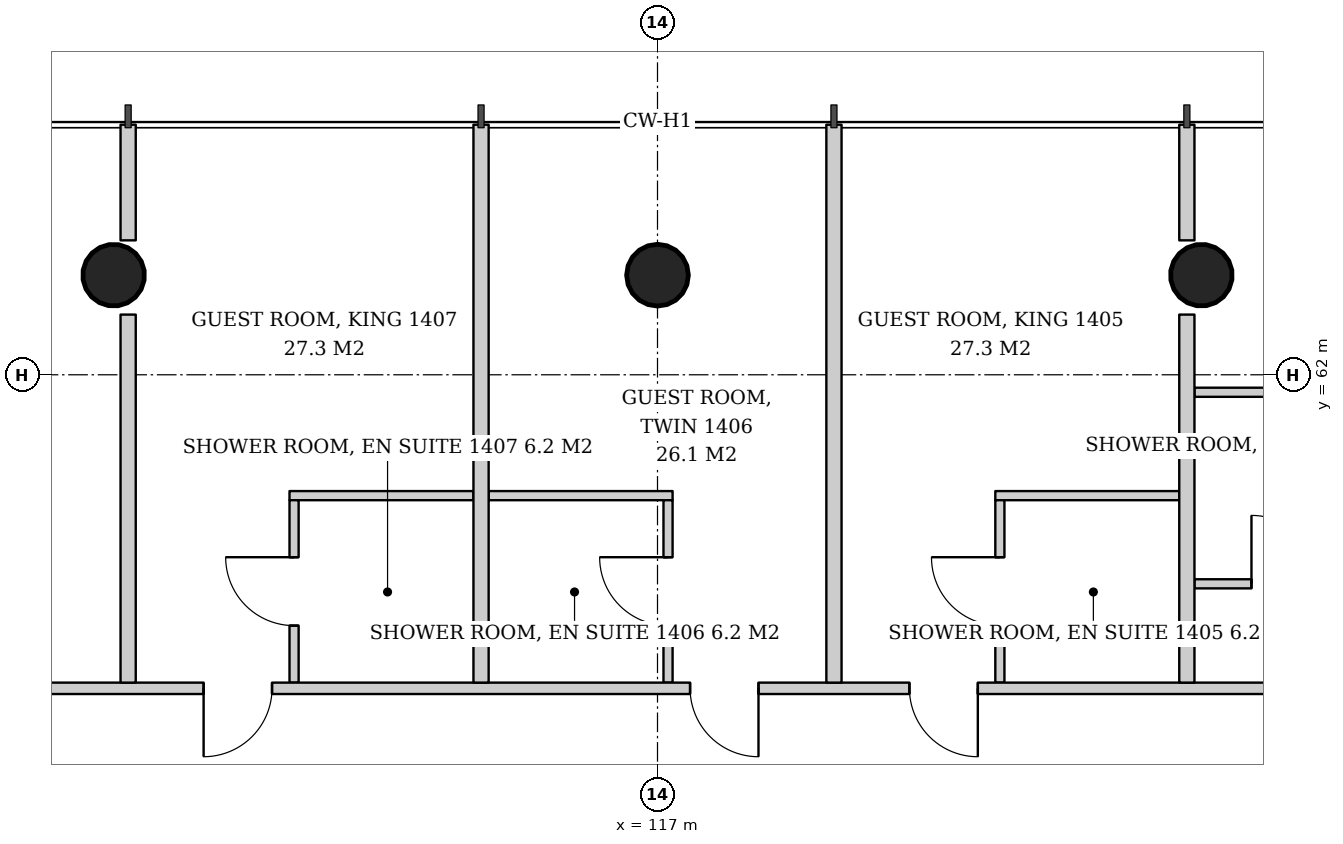
"""IFC4 building model, lengths in metres.
Left out: names, types, materials, properties, quantities, classifications, styles, units other than length and angle.
Written with IfcOpenShell. Run it as: python <this file> out.ifc"""

import sys

from ifc_helpers import new_model, si_unit, direction, frame, frame_2d, origin, origin_2d, place, context, subcontext, project, spatial, rectangle, hollow_circle, extrude, element, fill, save


model = new_model("IFC4")
c1 = context("Model", 3, precision=1e-05, world=origin(), true_north=direction((0.0, 1.0)))
c2 = subcontext(c1, "Body", "Model", "MODEL_VIEW")
j1 = project(units=[si_unit("LENGTHUNIT", "METRE"), si_unit("PLANEANGLEUNIT", "RADIAN")], contexts=[c1])
p1 = place(None, origin())
s1 = spatial("IfcSite", under=j1, at=p1, CompositionType="ELEMENT")
p2 = place(p1, origin())
s2 = spatial("IfcBuilding", under=s1, at=p2, CompositionType="ELEMENT")
p3 = place(p2, frame((0.0, 0.0, 59.0)))
s3 = spatial("IfcBuildingStorey", under=s2, at=p3, CompositionType="ELEMENT", Elevation=59.0)
p4 = place(p3, frame((124.181, 63.362, 0.0), z_axis=(-0.021561848751, -0.043059525333, 0.998839808957), x_axis=(0.894160516368, -0.44774654769, 0.0)))
e1 = element("IfcColumn", 1, at=p4, inside=s3, PredefinedType="COLUMN", context=c2, shape_type="SweptSolid", body=[
    extrude(hollow_circle(Radius=0.406, WallThickness=0.03, at=origin_2d()), origin(), (0.0, 0.0, 1.0), 3.804),
])
p5 = place(p3, frame((117.0, 63.362, 0.0), z_axis=(0.0, -0.043069538298, 0.999072076915), x_axis=(1.0, 0.0, 0.0)))
e2 = element("IfcColumn", 2, at=p5, inside=s3, PredefinedType="COLUMN", context=c2, shape_type="SweptSolid", body=[
    extrude(hollow_circle(Radius=0.406, WallThickness=0.03, at=origin_2d()), origin(), (0.0, 0.0, 1.0), 3.803),
])
p6 = place(p3, frame((109.819, 63.362, 0.0), z_axis=(0.021561848751, -0.043059525333, 0.998839808957), x_axis=(0.894160516368, 0.44774654769, 0.0)))
e3 = element("IfcColumn", 3, at=p6, inside=s3, PredefinedType="COLUMN", context=c2, shape_type="SweptSolid", body=[
    extrude(hollow_circle(Radius=0.406, WallThickness=0.03, at=origin_2d()), origin(), (0.0, 0.0, 1.0), 3.804),
])
p7 = place(p3, frame((124.064, 59.25, 0.0), z_axis=(0.0, 0.0, 1.0), x_axis=(1.0, 0.0, 0.0)))
e4 = element("IfcWall", 4, at=p7, inside=s3, PredefinedType="PARTITIONING", context=c2, shape_type="SweptSolid", body=[
    extrude(rectangle(XDim=2.58, YDim=0.12, at=frame_2d((1.29, 0.0))), origin(), (0.0, 0.0, 1.0), 2.8),
])
p8 = place(p7, frame((0.75, 0.0, 0.0)))
e5 = element("IfcOpeningElement", 5, at=p8, cuts=e4, PredefinedType="OPENING", context=c2, shape_type="SweptSolid", body=[
    extrude(rectangle(XDim=0.9, YDim=2.1, at=frame_2d((0.45, 1.05))), frame((0.0, 0.07, 0.0), z_axis=(0.0, -1.0, 0.0), x_axis=(1.0, 0.0, 0.0)), (0.0, 0.0, 1.0), 0.14),
])
p9 = place(p3, frame((124.064, 61.77, 0.0), z_axis=(0.0, 0.0, 1.0), x_axis=(1.0, 0.0, 0.0)))
e6 = element("IfcWall", 6, at=p9, inside=s3, PredefinedType="PARTITIONING", context=c2, shape_type="SweptSolid", body=[
    extrude(rectangle(XDim=2.58, YDim=0.12, at=frame_2d((1.29, 0.0))), origin(), (0.0, 0.0, 1.0), 2.8),
])
p10 = place(p3, frame((123.864, 60.41, 0.0), z_axis=(0.0, 0.0, 1.0), x_axis=(-1.0, 0.0, 0.0)))
e7 = element("IfcWall", 7, at=p10, inside=s3, PredefinedType="PARTITIONING", context=c2, shape_type="SweptSolid", body=[
    extrude(rectangle(XDim=2.42, YDim=0.12, at=frame_2d((1.21, 0.0))), origin(), (0.0, 0.0, 1.0), 2.847),
])
p11 = place(p3, frame((121.504, 57.95, 0.0), z_axis=(0.0, 0.0, 1.0), x_axis=(0.0, 1.0, 0.0)))
e8 = element("IfcWall", 8, at=p11, inside=s3, PredefinedType="PARTITIONING", context=c2, shape_type="SweptSolid", body=[
    extrude(rectangle(XDim=2.4, YDim=0.12, at=frame_2d((1.2, 0.0))), origin(), (0.0, 0.0, 1.0), 3.6),
])
p12 = place(p11, frame((0.75, 0.0, 0.0)))
e9 = element("IfcOpeningElement", 9, at=p12, cuts=e8, PredefinedType="OPENING", context=c2, shape_type="SweptSolid", body=[
    extrude(rectangle(XDim=0.9, YDim=2.1, at=frame_2d((0.45, 1.05))), frame((0.0, 0.07, 0.0), z_axis=(0.0, -1.0, 0.0), x_axis=(1.0, 0.0, 0.0)), (0.0, 0.0, 1.0), 0.14),
])
p13 = place(p3, frame((117.198, 60.41, 0.0), z_axis=(0.0, 0.0, 1.0), x_axis=(-1.0, 0.0, 0.0)))
e10 = element("IfcWall", 10, at=p13, inside=s3, PredefinedType="PARTITIONING", context=c2, shape_type="SweptSolid", body=[
    extrude(rectangle(XDim=2.42, YDim=0.12, at=frame_2d((1.21, 0.0))), origin(), (0.0, 0.0, 1.0), 3.6),
])
p14 = place(p3, frame((117.139, 57.95, 0.0), z_axis=(0.0, 0.0, 1.0), x_axis=(0.0, 1.0, 0.0)))
e11 = element("IfcWall", 11, at=p14, inside=s3, PredefinedType="PARTITIONING", context=c2, shape_type="SweptSolid", body=[
    extrude(rectangle(XDim=2.4, YDim=0.12, at=frame_2d((1.2, 0.0))), origin(), (0.0, 0.0, 1.0), 3.6),
])
p15 = place(p14, frame((0.75, 0.0, 0.0)))
e12 = element("IfcOpeningElement", 12, at=p15, cuts=e11, PredefinedType="OPENING", context=c2, shape_type="SweptSolid", body=[
    extrude(rectangle(XDim=0.9, YDim=2.1, at=frame_2d((0.45, 1.05))), frame((0.0, 0.07, 0.0), z_axis=(0.0, -1.0, 0.0), x_axis=(1.0, 0.0, 0.0)), (0.0, 0.0, 1.0), 0.14),
])
p16 = place(p3, frame((114.579, 60.41, 0.0), z_axis=(0.0, 0.0, 1.0), x_axis=(-1.0, 0.0, 0.0)))
e13 = element("IfcWall", 13, at=p16, inside=s3, PredefinedType="PARTITIONING", context=c2, shape_type="SweptSolid", body=[
    extrude(rectangle(XDim=2.42, YDim=0.12, at=frame_2d((1.21, 0.0))), origin(), (0.0, 0.0, 1.0), 2.847),
])
p17 = place(p3, frame((112.219, 57.95, 0.0), z_axis=(0.0, 0.0, 1.0), x_axis=(0.0, 1.0, 0.0)))
e14 = element("IfcWall", 14, at=p17, inside=s3, PredefinedType="PARTITIONING", context=c2, shape_type="SweptSolid", body=[
    extrude(rectangle(XDim=2.4, YDim=0.12, at=frame_2d((1.2, 0.0))), origin(), (0.0, 0.0, 1.0), 3.6),
])
p18 = place(p17, frame((0.75, 0.0, 0.0)))
e15 = element("IfcOpeningElement", 15, at=p18, cuts=e14, PredefinedType="OPENING", context=c2, shape_type="SweptSolid", body=[
    extrude(rectangle(XDim=0.9, YDim=2.1, at=frame_2d((0.45, 1.05))), frame((0.0, 0.07, 0.0), z_axis=(0.0, -1.0, 0.0), x_axis=(1.0, 0.0, 0.0)), (0.0, 0.0, 1.0), 0.14),
])
p19 = place(p3, frame((128.95, 57.875, 0.0), z_axis=(0.0, 0.0, 1.0), x_axis=(-1.0, 0.0, 0.0)))
e16 = element("IfcWall", 16, at=p19, inside=s3, PredefinedType="PARTITIONING", context=c2, shape_type="SweptSolid", body=[
    extrude(rectangle(XDim=23.75, YDim=0.15, at=frame_2d((11.875, 0.0))), origin(), (0.0, 0.0, 1.0), 2.8),
])
p20 = place(p19, frame((2.068, 0.0, 0.0)))
e17 = element("IfcOpeningElement", 17, at=p20, cuts=e16, PredefinedType="OPENING", context=c2, shape_type="SweptSolid", body=[
    extrude(rectangle(XDim=0.9, YDim=2.1, at=frame_2d((0.45, 1.05))), frame((0.0, 0.085, 0.0), z_axis=(0.0, -1.0, 0.0), x_axis=(1.0, 0.0, 0.0)), (0.0, 0.0, 1.0), 0.17),
])
p21 = place(p19, frame((7.736, 0.0, 0.0)))
e18 = element("IfcOpeningElement", 18, at=p21, cuts=e16, PredefinedType="OPENING", context=c2, shape_type="SweptSolid", body=[
    extrude(rectangle(XDim=0.9, YDim=2.1, at=frame_2d((0.45, 1.05))), frame((0.0, 0.085, 0.0), z_axis=(0.0, -1.0, 0.0), x_axis=(1.0, 0.0, 0.0)), (0.0, 0.0, 1.0), 0.17),
])
p22 = place(p19, frame((10.621, 0.0, 0.0)))
e19 = element("IfcOpeningElement", 19, at=p22, cuts=e16, PredefinedType="OPENING", context=c2, shape_type="SweptSolid", body=[
    extrude(rectangle(XDim=0.9, YDim=2.1, at=frame_2d((0.45, 1.05))), frame((0.0, 0.085, 0.0), z_axis=(0.0, -1.0, 0.0), x_axis=(1.0, 0.0, 0.0)), (0.0, 0.0, 1.0), 0.17),
])
p23 = place(p19, frame((17.021, 0.0, 0.0)))
e20 = element("IfcOpeningElement", 20, at=p23, cuts=e16, PredefinedType="OPENING", context=c2, shape_type="SweptSolid", body=[
    extrude(rectangle(XDim=0.9, YDim=2.1, at=frame_2d((0.45, 1.05))), frame((0.0, 0.085, 0.0), z_axis=(0.0, -1.0, 0.0), x_axis=(1.0, 0.0, 0.0)), (0.0, 0.0, 1.0), 0.17),
])
p24 = place(p3, frame((123.964, 57.95, 0.0), z_axis=(0.0, 0.0, 1.0), x_axis=(0.0, 1.0, 0.0)))
e21 = element("IfcWall", 21, at=p24, inside=s3, PredefinedType="PARTITIONING", context=c2, shape_type="SweptSolid", body=[
    extrude(rectangle(XDim=4.842, YDim=0.2, at=frame_2d((2.421, 0.0))), origin(), (0.0, 0.0, 1.0), 3.6),
])
p25 = place(p3, frame((123.964, 63.769, 0.0), z_axis=(0.0, 0.0, 1.0), x_axis=(0.0, 1.0, 0.0)))
e22 = element("IfcWall", 22, at=p25, inside=s3, PredefinedType="PARTITIONING", context=c2, shape_type="SweptSolid", body=[
    extrude(rectangle(XDim=1.521, YDim=0.2, at=frame_2d((0.761, 0.0))), origin(), (0.0, 0.0, 1.0), 3.6),
])
for number, where, z_axis, x_axis in (
    (23, (119.322, 57.95, 0.0), (0.0, 0.0, 1.0), (0.0, 1.0, 0.0)),
    (24, (114.678, 57.95, 0.0), (0.0, 0.0, 1.0), (0.0, 1.0, 0.0)),
):
    element("IfcWall", number, at=place(p3, frame(where, z_axis=z_axis, x_axis=x_axis)), inside=s3, PredefinedType="PARTITIONING", context=c2, shape_type="SweptSolid", body=[
        extrude(rectangle(XDim=7.34, YDim=0.2, at=frame_2d((3.67, 0.0))), origin(), (0.0, 0.0, 1.0), 3.05),
    ])
p26 = place(p3, frame((110.036, 57.95, 0.0), z_axis=(0.0, 0.0, 1.0), x_axis=(0.0, 1.0, 0.0)))
e25 = element("IfcWall", 25, at=p26, inside=s3, PredefinedType="PARTITIONING", context=c2, shape_type="SweptSolid", body=[
    extrude(rectangle(XDim=4.842, YDim=0.2, at=frame_2d((2.421, 0.0))), origin(), (0.0, 0.0, 1.0), 3.6),
])
p27 = place(p3, frame((110.036, 63.769, 0.0), z_axis=(0.0, 0.0, 1.0), x_axis=(0.0, 1.0, 0.0)))
e26 = element("IfcWall", 26, at=p27, inside=s3, PredefinedType="PARTITIONING", context=c2, shape_type="SweptSolid", body=[
    extrude(rectangle(XDim=1.521, YDim=0.2, at=frame_2d((0.761, 0.0))), origin(), (0.0, 0.0, 1.0), 3.6),
])
p28 = place(p8, origin())
e27 = element("IfcDoor", 27, at=p28, inside=s3, OperationType="SINGLE_SWING_LEFT", PredefinedType="DOOR", context=c2, shape_type="SweptSolid", body=[
    extrude(rectangle(XDim=0.9, YDim=2.1, at=frame_2d((0.45, 1.05))), frame((0.0, 0.025, 0.0), z_axis=(0.0, -1.0, 0.0), x_axis=(1.0, 0.0, 0.0)), (0.0, 0.0, 1.0), 0.05),
])
fill(e5, e27)
p29 = place(p12, origin())
e28 = element("IfcDoor", 28, at=p29, inside=s3, OperationType="SINGLE_SWING_RIGHT", PredefinedType="DOOR", context=c2, shape_type="SweptSolid", body=[
    extrude(rectangle(XDim=0.9, YDim=2.1, at=frame_2d((0.45, 1.05))), frame((0.0, 0.025, 0.0), z_axis=(0.0, -1.0, 0.0), x_axis=(1.0, 0.0, 0.0)), (0.0, 0.0, 1.0), 0.05),
])
fill(e9, e28)
p30 = place(p15, origin())
e29 = element("IfcDoor", 29, at=p30, inside=s3, OperationType="SINGLE_SWING_RIGHT", PredefinedType="DOOR", context=c2, shape_type="SweptSolid", body=[
    extrude(rectangle(XDim=0.9, YDim=2.1, at=frame_2d((0.45, 1.05))), frame((0.0, 0.025, 0.0), z_axis=(0.0, -1.0, 0.0), x_axis=(1.0, 0.0, 0.0)), (0.0, 0.0, 1.0), 0.05),
])
fill(e12, e29)
p31 = place(p18, origin())
e30 = element("IfcDoor", 30, at=p31, inside=s3, OperationType="SINGLE_SWING_RIGHT", PredefinedType="DOOR", context=c2, shape_type="SweptSolid", body=[
    extrude(rectangle(XDim=0.9, YDim=2.1, at=frame_2d((0.45, 1.05))), frame((0.0, 0.025, 0.0), z_axis=(0.0, -1.0, 0.0), x_axis=(1.0, 0.0, 0.0)), (0.0, 0.0, 1.0), 0.05),
])
fill(e15, e30)
p32 = place(p21, origin())
e31 = element("IfcDoor", 31, at=p32, inside=s3, OperationType="SINGLE_SWING_LEFT", PredefinedType="DOOR", context=c2, shape_type="SweptSolid", body=[
    extrude(rectangle(XDim=0.9, YDim=2.1, at=frame_2d((0.45, 1.05))), frame((0.0, 0.025, 0.0), z_axis=(0.0, -1.0, 0.0), x_axis=(1.0, 0.0, 0.0)), (0.0, 0.0, 1.0), 0.05),
])
fill(e18, e31)
p33 = place(p22, origin())
e32 = element("IfcDoor", 32, at=p33, inside=s3, OperationType="SINGLE_SWING_LEFT", PredefinedType="DOOR", context=c2, shape_type="SweptSolid", body=[
    extrude(rectangle(XDim=0.9, YDim=2.1, at=frame_2d((0.45, 1.05))), frame((0.0, 0.025, 0.0), z_axis=(0.0, -1.0, 0.0), x_axis=(1.0, 0.0, 0.0)), (0.0, 0.0, 1.0), 0.05),
])
fill(e19, e32)
p34 = place(p23, origin())
e33 = element("IfcDoor", 33, at=p34, inside=s3, OperationType="SINGLE_SWING_RIGHT", PredefinedType="DOOR", context=c2, shape_type="SweptSolid", body=[
    extrude(rectangle(XDim=0.9, YDim=2.1, at=frame_2d((0.45, 1.05))), frame((0.0, 0.025, 0.0), z_axis=(0.0, -1.0, 0.0), x_axis=(1.0, 0.0, 0.0)), (0.0, 0.0, 1.0), 0.05),
])
fill(e20, e33)
save(model, sys.argv[1])
